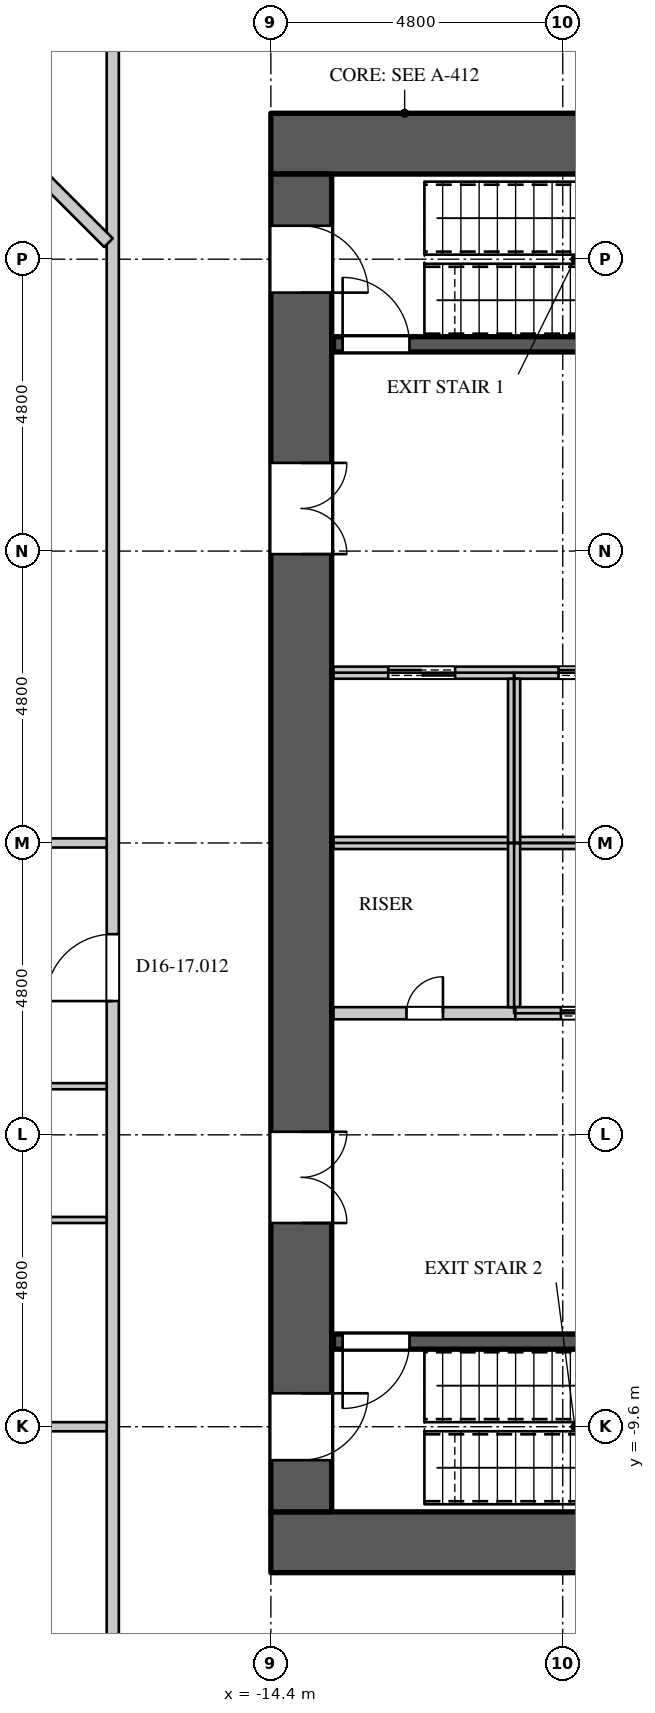
"""IFC4 building model, lengths in metres.
Left out: names, types, materials, properties, quantities, classifications, styles, units other than length and angle.
Written with IfcOpenShell. Run it as: python <this file> out.ifc"""

import sys

from ifc_helpers import new_model, si_unit, direction, frame, frame_2d, origin, place, context, subcontext, project, spatial, rectangle, extrude, element, fill, save


model = new_model("IFC4")
c1 = context("Model", 3, precision=1e-05, world=origin(), true_north=direction((0.0, 1.0)))
c2 = subcontext(c1, "Body", "Model", "MODEL_VIEW")
j1 = project(units=[si_unit("LENGTHUNIT", "METRE"), si_unit("PLANEANGLEUNIT", "RADIAN")], contexts=[c1])
p1 = place(None, origin())
s1 = spatial("IfcSite", under=j1, at=p1, CompositionType="ELEMENT")
p2 = place(p1, origin())
s2 = spatial("IfcBuilding", under=s1, at=p2, CompositionType="ELEMENT")
p3 = place(p2, frame((0.0, 0.0, 71.7)))
s3 = spatial("IfcBuildingStorey", under=s2, at=p3, CompositionType="ELEMENT", Elevation=71.7)
for number, where, z_axis, x_axis in (
    (1, (-14.4, 11.5, 0.0), (0.0, 0.0, 1.0), (1.0, 0.0, 0.0)),
    (2, (-14.4, -11.5, 0.0), (0.0, 0.0, 1.0), (1.0, 0.0, 0.0)),
):
    element("IfcWall", number, at=place(p3, frame(where, z_axis=z_axis, x_axis=x_axis)), inside=s3, PredefinedType="SHEAR", context=c2, shape_type="SweptSolid", body=[
        extrude(rectangle(XDim=28.8, YDim=1.0, at=frame_2d((14.4, 0.0))), origin(), (0.0, 0.0, 1.0), 4.2),
    ])
p4 = place(p3, frame((-13.9, -11.0, 0.0), z_axis=(0.0, 0.0, 1.0), x_axis=(0.0, 1.0, 0.0)))
e3 = element("IfcWall", 3, at=p4, inside=s3, PredefinedType="SHEAR", context=c2, shape_type="SweptSolid", body=[
    extrude(rectangle(XDim=22.0, YDim=1.0, at=frame_2d((11.0, 0.0))), origin(), (0.0, 0.0, 1.0), 4.2),
])
p5 = place(p4, frame((20.05, 0.0, 0.0)))
e4 = element("IfcOpeningElement", 4, at=p5, cuts=e3, PredefinedType="OPENING", context=c2, shape_type="SweptSolid", body=[
    extrude(rectangle(XDim=1.1, YDim=2.2, at=frame_2d((0.55, 1.1))), frame((0.0, 0.51, 0.0), z_axis=(0.0, -1.0, 0.0), x_axis=(1.0, 0.0, 0.0)), (0.0, 0.0, 1.0), 1.02),
])
p6 = place(p4, frame((0.85, 0.0, 0.0)))
e5 = element("IfcOpeningElement", 5, at=p6, cuts=e3, PredefinedType="OPENING", context=c2, shape_type="SweptSolid", body=[
    extrude(rectangle(XDim=1.1, YDim=2.2, at=frame_2d((0.55, 1.1))), frame((0.0, 0.51, 0.0), z_axis=(0.0, -1.0, 0.0), x_axis=(1.0, 0.0, 0.0)), (0.0, 0.0, 1.0), 1.02),
])
p7 = place(p4, frame((15.75, 0.0, 0.0)))
e6 = element("IfcOpeningElement", 6, at=p7, cuts=e3, PredefinedType="OPENING", context=c2, shape_type="SweptSolid", body=[
    extrude(rectangle(XDim=1.5, YDim=2.4, at=frame_2d((0.75, 1.2))), frame((0.0, 0.51, 0.0), z_axis=(0.0, -1.0, 0.0), x_axis=(1.0, 0.0, 0.0)), (0.0, 0.0, 1.0), 1.02),
])
p8 = place(p4, frame((4.75, 0.0, 0.0)))
e7 = element("IfcOpeningElement", 7, at=p8, cuts=e3, PredefinedType="OPENING", context=c2, shape_type="SweptSolid", body=[
    extrude(rectangle(XDim=1.5, YDim=2.4, at=frame_2d((0.75, 1.2))), frame((0.0, 0.51, 0.0), z_axis=(0.0, -1.0, 0.0), x_axis=(1.0, 0.0, 0.0)), (0.0, 0.0, 1.0), 1.02),
])
p9 = place(p3, frame((-17.0, -14.5, 0.0), z_axis=(0.0, 0.0, 1.0), x_axis=(0.0, 1.0, 0.0)))
e8 = element("IfcWall", 8, at=p9, inside=s3, PredefinedType="PARTITIONING", context=c2, shape_type="SweptSolid", body=[
    extrude(rectangle(XDim=29.0, YDim=0.2, at=frame_2d((14.5, 0.0))), origin(), (0.0, 0.0, 1.0), 3.95),
])
p10 = place(p9, frame((11.9, 0.0, 0.0)))
e9 = element("IfcOpeningElement", 9, at=p10, cuts=e8, PredefinedType="OPENING", context=c2, shape_type="SweptSolid", body=[
    extrude(rectangle(XDim=1.1, YDim=2.4, at=frame_2d((0.55, 1.2))), frame((0.0, 0.11, 0.0), z_axis=(0.0, -1.0, 0.0), x_axis=(1.0, 0.0, 0.0)), (0.0, 0.0, 1.0), 0.22),
])
p11 = place(p3, frame((-28.855, -9.6, 0.0), z_axis=(0.0, 0.0, 1.0), x_axis=(1.0, 0.0, 0.0)))
e10 = element("IfcWall", 10, at=p11, inside=s3, PredefinedType="PARTITIONING", context=c2, shape_type="SweptSolid", body=[
    extrude(rectangle(XDim=11.755, YDim=0.15, at=frame_2d((5.877, 0.0))), origin(), (0.0, 0.0, 1.0), 3.95),
])
p12 = place(p11, frame((2.3, 0.0, 0.0)))
e11 = element("IfcOpeningElement", 11, at=p12, cuts=e10, PredefinedType="OPENING", context=c2, shape_type="SweptSolid", body=[
    extrude(rectangle(XDim=1.5, YDim=2.2, at=frame_2d((0.75, 1.1))), frame((0.0, 0.085, 0.0), z_axis=(0.0, -1.0, 0.0), x_axis=(1.0, 0.0, 0.0)), (0.0, 0.0, 1.0), 0.17),
])
p13 = place(p11, frame((9.0, 0.0, 0.0)))
e12 = element("IfcOpeningElement", 12, at=p13, cuts=e10, PredefinedType="OPENING", context=c2, shape_type="SweptSolid", body=[
    extrude(rectangle(XDim=0.95, YDim=2.2, at=frame_2d((0.475, 1.1))), frame((0.0, 0.085, 0.0), z_axis=(0.0, -1.0, 0.0), x_axis=(1.0, 0.0, 0.0)), (0.0, 0.0, 1.0), 0.17),
])
p14 = place(p3, frame((-28.855, 0.0, 0.0), z_axis=(0.0, 0.0, 1.0), x_axis=(1.0, 0.0, 0.0)))
e13 = element("IfcWall", 13, at=p14, inside=s3, PredefinedType="PARTITIONING", context=c2, shape_type="SweptSolid", body=[
    extrude(rectangle(XDim=11.755, YDim=0.15, at=frame_2d((5.877, 0.0))), origin(), (0.0, 0.0, 1.0), 3.95),
])
p15 = place(p14, frame((9.0, 0.0, 0.0)))
e14 = element("IfcOpeningElement", 14, at=p15, cuts=e13, PredefinedType="OPENING", context=c2, shape_type="SweptSolid", body=[
    extrude(rectangle(XDim=0.95, YDim=2.2, at=frame_2d((0.475, 1.1))), frame((0.0, 0.085, 0.0), z_axis=(0.0, -1.0, 0.0), x_axis=(1.0, 0.0, 0.0)), (0.0, 0.0, 1.0), 0.17),
])
p16 = place(p3, frame((-22.747, -11.968, 0.0), z_axis=(0.0, 0.0, 1.0), x_axis=(0.707106781187, -0.707106781187, 0.0)))
e15 = element("IfcWall", 15, at=p16, inside=s3, PredefinedType="PARTITIONING", context=c2, shape_type="SweptSolid", body=[
    extrude(rectangle(XDim=12.613, YDim=0.15, at=frame_2d((6.307, 0.0))), origin(), (0.0, 0.0, 1.0), 3.95),
])
p17 = place(p16, frame((4.45, 0.0, 0.0)))
e16 = element("IfcOpeningElement", 16, at=p17, cuts=e15, PredefinedType="OPENING", context=c2, shape_type="SweptSolid", body=[
    extrude(rectangle(XDim=0.95, YDim=2.2, at=frame_2d((0.475, 1.1))), frame((0.0, 0.085, 0.0), z_axis=(0.0, -1.0, 0.0), x_axis=(1.0, 0.0, 0.0)), (0.0, 0.0, 1.0), 0.17),
])
p18 = place(p16, frame((9.65, 0.0, 0.0)))
e17 = element("IfcOpeningElement", 17, at=p18, cuts=e15, PredefinedType="OPENING", context=c2, shape_type="SweptSolid", body=[
    extrude(rectangle(XDim=0.95, YDim=2.2, at=frame_2d((0.475, 1.1))), frame((0.0, 0.085, 0.0), z_axis=(0.0, -1.0, 0.0), x_axis=(1.0, 0.0, 0.0)), (0.0, 0.0, 1.0), 0.17),
])
p19 = place(p3, frame((-25.239, 18.039, 0.0), z_axis=(0.0, 0.0, 1.0), x_axis=(0.707096213553, -0.707117348662, 0.0)))
e18 = element("IfcWall", 18, at=p19, inside=s3, PredefinedType="PARTITIONING", context=c2, shape_type="SweptSolid", body=[
    extrude(rectangle(XDim=11.552, YDim=0.2, at=frame_2d((5.776, 0.0))), origin(), (0.0, 0.0, 1.0), 3.95),
])
p20 = place(p3, frame((-13.37, -2.8, 0.0), z_axis=(0.0, 0.0, 1.0), x_axis=(1.0, 0.0, 0.0)))
e19 = element("IfcWall", 19, at=p20, inside=s3, PredefinedType="PARTITIONING", context=c2, shape_type="SweptSolid", body=[
    extrude(rectangle(XDim=2.99, YDim=0.2, at=frame_2d((1.495, 0.0))), origin(), (0.0, 0.0, 1.0), 3.95),
])
p21 = place(p20, frame((1.2, 0.0, 0.0)))
e20 = element("IfcOpeningElement", 20, at=p21, cuts=e19, PredefinedType="OPENING", context=c2, shape_type="SweptSolid", body=[
    extrude(rectangle(XDim=0.6, YDim=2.0, at=frame_2d((0.3, 1.0))), frame((0.0, 0.11, 0.0), z_axis=(0.0, -1.0, 0.0), x_axis=(1.0, 0.0, 0.0)), (0.0, 0.0, 1.0), 0.22),
])
p22 = place(p3, frame((-13.37, 0.0, 0.0), z_axis=(0.0, 0.0, 1.0), x_axis=(1.0, 0.0, 0.0)))
e21 = element("IfcWall", 21, at=p22, inside=s3, PredefinedType="PARTITIONING", context=c2, shape_type="SweptSolid", body=[
    extrude(rectangle(XDim=23.77, YDim=0.2, at=frame_2d((11.885, 0.0))), origin(), (0.0, 0.0, 1.0), 3.95),
])
p23 = place(p3, frame((-13.37, 2.8, 0.0), z_axis=(0.0, 0.0, 1.0), x_axis=(1.0, 0.0, 0.0)))
e22 = element("IfcWall", 22, at=p23, inside=s3, PredefinedType="PARTITIONING", context=c2, shape_type="SweptSolid", body=[
    extrude(rectangle(XDim=23.77, YDim=0.2, at=frame_2d((11.885, 0.0))), origin(), (0.0, 0.0, 1.0), 3.95),
])
p24 = place(p23, frame((0.9, 0.0, 0.0)))
e23 = element("IfcOpeningElement", 23, at=p24, cuts=e22, PredefinedType="OPENING", context=c2, shape_type="SweptSolid", body=[
    extrude(rectangle(XDim=1.1, YDim=2.2, at=frame_2d((0.55, 1.1))), frame((0.0, 0.11, 0.0), z_axis=(0.0, -1.0, 0.0), x_axis=(1.0, 0.0, 0.0)), (0.0, 0.0, 1.0), 0.22),
])
p25 = place(p23, frame((3.7, 0.0, 0.0)))
e24 = element("IfcOpeningElement", 24, at=p25, cuts=e22, PredefinedType="OPENING", context=c2, shape_type="SweptSolid", body=[
    extrude(rectangle(XDim=1.1, YDim=2.2, at=frame_2d((0.55, 1.1))), frame((0.0, 0.11, 0.0), z_axis=(0.0, -1.0, 0.0), x_axis=(1.0, 0.0, 0.0)), (0.0, 0.0, 1.0), 0.22),
])
p26 = place(p23, frame((6.3, 0.0, 0.0)))
e25 = element("IfcOpeningElement", 25, at=p26, cuts=e22, PredefinedType="OPENING", context=c2, shape_type="SweptSolid", body=[
    extrude(rectangle(XDim=1.1, YDim=2.2, at=frame_2d((0.55, 1.1))), frame((0.0, 0.11, 0.0), z_axis=(0.0, -1.0, 0.0), x_axis=(1.0, 0.0, 0.0)), (0.0, 0.0, 1.0), 0.22),
])
p27 = place(p23, frame((8.9, 0.0, 0.0)))
e26 = element("IfcOpeningElement", 26, at=p27, cuts=e22, PredefinedType="OPENING", context=c2, shape_type="SweptSolid", body=[
    extrude(rectangle(XDim=1.1, YDim=2.2, at=frame_2d((0.55, 1.1))), frame((0.0, 0.11, 0.0), z_axis=(0.0, -1.0, 0.0), x_axis=(1.0, 0.0, 0.0)), (0.0, 0.0, 1.0), 0.22),
])
p28 = place(p23, frame((11.5, 0.0, 0.0)))
e27 = element("IfcOpeningElement", 27, at=p28, cuts=e22, PredefinedType="OPENING", context=c2, shape_type="SweptSolid", body=[
    extrude(rectangle(XDim=1.1, YDim=2.2, at=frame_2d((0.55, 1.1))), frame((0.0, 0.11, 0.0), z_axis=(0.0, -1.0, 0.0), x_axis=(1.0, 0.0, 0.0)), (0.0, 0.0, 1.0), 0.22),
])
p29 = place(p23, frame((14.1, 0.0, 0.0)))
e28 = element("IfcOpeningElement", 28, at=p29, cuts=e22, PredefinedType="OPENING", context=c2, shape_type="SweptSolid", body=[
    extrude(rectangle(XDim=1.1, YDim=2.2, at=frame_2d((0.55, 1.1))), frame((0.0, 0.11, 0.0), z_axis=(0.0, -1.0, 0.0), x_axis=(1.0, 0.0, 0.0)), (0.0, 0.0, 1.0), 0.22),
])
p30 = place(p23, frame((16.7, 0.0, 0.0)))
e29 = element("IfcOpeningElement", 29, at=p30, cuts=e22, PredefinedType="OPENING", context=c2, shape_type="SweptSolid", body=[
    extrude(rectangle(XDim=1.1, YDim=2.2, at=frame_2d((0.55, 1.1))), frame((0.0, 0.11, 0.0), z_axis=(0.0, -1.0, 0.0), x_axis=(1.0, 0.0, 0.0)), (0.0, 0.0, 1.0), 0.22),
])
p31 = place(p23, frame((19.3, 0.0, 0.0)))
e30 = element("IfcOpeningElement", 30, at=p31, cuts=e22, PredefinedType="OPENING", context=c2, shape_type="SweptSolid", body=[
    extrude(rectangle(XDim=1.1, YDim=2.2, at=frame_2d((0.55, 1.1))), frame((0.0, 0.11, 0.0), z_axis=(0.0, -1.0, 0.0), x_axis=(1.0, 0.0, 0.0)), (0.0, 0.0, 1.0), 0.22),
])
p32 = place(p3, frame((-10.4, -2.7, 0.0), z_axis=(0.0, 0.0, 1.0), x_axis=(0.0, 1.0, 0.0)))
e31 = element("IfcWall", 31, at=p32, inside=s3, PredefinedType="PARTITIONING", context=c2, shape_type="SweptSolid", body=[
    extrude(rectangle(XDim=2.7, YDim=0.2, at=frame_2d((1.35, 0.0))), origin(), (0.0, 0.0, 1.0), 3.95),
])
p33 = place(p3, frame((-10.38, -2.8, 0.0), z_axis=(0.0, 0.0, 1.0), x_axis=(1.0, 0.0, 0.0)))
e32 = element("IfcWall", 32, at=p33, inside=s3, PredefinedType="PARTITIONING", context=c2, shape_type="SweptSolid", body=[
    extrude(rectangle(XDim=2.58, YDim=0.2, at=frame_2d((1.29, 0.0))), origin(), (0.0, 0.0, 1.0), 3.95),
])
p34 = place(p33, frame((0.75, 0.0, 0.0)))
e33 = element("IfcOpeningElement", 33, at=p34, cuts=e32, PredefinedType="OPENING", context=c2, shape_type="SweptSolid", body=[
    extrude(rectangle(XDim=1.1, YDim=2.2, at=frame_2d((0.55, 1.1))), frame((0.0, 0.11, 0.0), z_axis=(0.0, -1.0, 0.0), x_axis=(1.0, 0.0, 0.0)), (0.0, 0.0, 1.0), 0.22),
])
p35 = place(p3, frame((-10.4, 0.0, 0.0), z_axis=(0.0, 0.0, 1.0), x_axis=(0.0, 1.0, 0.0)))
e34 = element("IfcWall", 34, at=p35, inside=s3, PredefinedType="PARTITIONING", context=c2, shape_type="SweptSolid", body=[
    extrude(rectangle(XDim=2.7, YDim=0.2, at=frame_2d((1.35, 0.0))), origin(), (0.0, 0.0, 1.0), 3.95),
])
p36 = place(p3, frame((-13.37, -8.2, 0.0), z_axis=(0.0, 0.0, 1.0), x_axis=(1.0, 0.0, 0.0)))
e35 = element("IfcWall", 35, at=p36, inside=s3, PredefinedType="SHEAR", context=c2, shape_type="SweptSolid", body=[
    extrude(rectangle(XDim=8.095, YDim=0.25, at=frame_2d((4.048, 0.0))), origin(), (0.0, 0.0, 1.0), 3.95),
])
p37 = place(p36, frame((0.15, 0.0, 0.0)))
e36 = element("IfcOpeningElement", 36, at=p37, cuts=e35, PredefinedType="OPENING", context=c2, shape_type="SweptSolid", body=[
    extrude(rectangle(XDim=1.1, YDim=2.2, at=frame_2d((0.55, 1.1))), frame((0.0, 0.135, 0.0), z_axis=(0.0, -1.0, 0.0), x_axis=(1.0, 0.0, 0.0)), (0.0, 0.0, 1.0), 0.27),
])
p38 = place(p3, frame((-13.37, 8.2, 0.0), z_axis=(0.0, 0.0, 1.0), x_axis=(1.0, 0.0, 0.0)))
e37 = element("IfcWall", 37, at=p38, inside=s3, PredefinedType="SHEAR", context=c2, shape_type="SweptSolid", body=[
    extrude(rectangle(XDim=8.095, YDim=0.25, at=frame_2d((4.048, 0.0))), origin(), (0.0, 0.0, 1.0), 3.95),
])
p39 = place(p38, frame((0.15, 0.0, 0.0)))
e38 = element("IfcOpeningElement", 38, at=p39, cuts=e37, PredefinedType="OPENING", context=c2, shape_type="SweptSolid", body=[
    extrude(rectangle(XDim=1.1, YDim=2.2, at=frame_2d((0.55, 1.1))), frame((0.0, 0.135, 0.0), z_axis=(0.0, -1.0, 0.0), x_axis=(1.0, 0.0, 0.0)), (0.0, 0.0, 1.0), 0.27),
])
p40 = place(p3, frame((-21.725, -6.2, 0.0), z_axis=(0.0, 0.0, 1.0), x_axis=(1.0, 0.0, 0.0)))
e39 = element("IfcWall", 39, at=p40, inside=s3, PredefinedType="PARTITIONING", context=c2, shape_type="SweptSolid", body=[
    extrude(rectangle(XDim=4.625, YDim=0.1, at=frame_2d((2.312, 0.0))), origin(), (0.0, 0.0, 1.0), 3.95),
])
p41 = place(p3, frame((-21.75, -4.0, 0.0), z_axis=(0.0, 0.0, 1.0), x_axis=(1.0, 0.0, 0.0)))
e40 = element("IfcWall", 40, at=p41, inside=s3, PredefinedType="PARTITIONING", context=c2, shape_type="SweptSolid", body=[
    extrude(rectangle(XDim=4.65, YDim=0.1, at=frame_2d((2.325, 0.0))), origin(), (0.0, 0.0, 1.0), 3.95),
])
p42 = place(p41, frame((1.9, 0.0, 0.0)))
e41 = element("IfcOpeningElement", 41, at=p42, cuts=e40, PredefinedType="OPENING", context=c2, shape_type="SweptSolid", body=[
    extrude(rectangle(XDim=0.9, YDim=2.2, at=frame_2d((0.45, 1.1))), frame((0.0, 0.06, 0.0), z_axis=(0.0, -1.0, 0.0), x_axis=(1.0, 0.0, 0.0)), (0.0, 0.0, 1.0), 0.12),
])
p43 = place(p21, origin())
e42 = element("IfcDoor", 42, at=p43, inside=s3, OperationType="SINGLE_SWING_RIGHT", PredefinedType="DOOR", context=c2, shape_type="SweptSolid", body=[
    extrude(rectangle(XDim=0.6, YDim=2.0, at=frame_2d((0.3, 1.0))), frame((0.0, 0.025, 0.0), z_axis=(0.0, -1.0, 0.0), x_axis=(1.0, 0.0, 0.0)), (0.0, 0.0, 1.0), 0.05),
])
fill(e20, e42)
p44 = place(p24, origin())
e43 = element("IfcDoor", 43, at=p44, inside=s3, OperationType="DOUBLE_DOOR_SLIDING", PredefinedType="DOOR", context=c2, shape_type="SweptSolid", body=[
    extrude(rectangle(XDim=1.1, YDim=2.2, at=frame_2d((0.55, 1.1))), frame((0.0, 0.025, 0.0), z_axis=(0.0, -1.0, 0.0), x_axis=(1.0, 0.0, 0.0)), (0.0, 0.0, 1.0), 0.05),
])
fill(e23, e43)
p45 = place(p25, origin())
e44 = element("IfcDoor", 44, at=p45, inside=s3, OperationType="DOUBLE_DOOR_SLIDING", PredefinedType="DOOR", context=c2, shape_type="SweptSolid", body=[
    extrude(rectangle(XDim=1.1, YDim=2.2, at=frame_2d((0.55, 1.1))), frame((0.0, 0.025, 0.0), z_axis=(0.0, -1.0, 0.0), x_axis=(1.0, 0.0, 0.0)), (0.0, 0.0, 1.0), 0.05),
])
fill(e24, e44)
p46 = place(p34, origin())
e45 = element("IfcDoor", 45, at=p46, inside=s3, OperationType="DOUBLE_DOOR_SLIDING", PredefinedType="DOOR", context=c2, shape_type="SweptSolid", body=[
    extrude(rectangle(XDim=1.1, YDim=2.2, at=frame_2d((0.55, 1.1))), frame((0.0, 0.025, 0.0), z_axis=(0.0, -1.0, 0.0), x_axis=(1.0, 0.0, 0.0)), (0.0, 0.0, 1.0), 0.05),
])
fill(e33, e45)
p47 = place(p39, origin())
e46 = element("IfcDoor", 46, at=p47, inside=s3, OperationType="SINGLE_SWING_LEFT", PredefinedType="DOOR", context=c2, shape_type="SweptSolid", body=[
    extrude(rectangle(XDim=1.1, YDim=2.2, at=frame_2d((0.55, 1.1))), frame((0.0, 0.025, 0.0), z_axis=(0.0, -1.0, 0.0), x_axis=(1.0, 0.0, 0.0)), (0.0, 0.0, 1.0), 0.05),
])
fill(e38, e46)
p48 = place(p37, origin())
e47 = element("IfcDoor", 47, at=p48, inside=s3, OperationType="SINGLE_SWING_RIGHT", PredefinedType="DOOR", context=c2, shape_type="SweptSolid", body=[
    extrude(rectangle(XDim=1.1, YDim=2.2, at=frame_2d((0.55, 1.1))), frame((0.0, 0.025, 0.0), z_axis=(0.0, -1.0, 0.0), x_axis=(1.0, 0.0, 0.0)), (0.0, 0.0, 1.0), 0.05),
])
fill(e36, e47)
p49 = place(p5, origin())
e48 = element("IfcDoor", 48, at=p49, inside=s3, OperationType="SINGLE_SWING_RIGHT", PredefinedType="DOOR", context=c2, shape_type="SweptSolid", body=[
    extrude(rectangle(XDim=1.1, YDim=2.2, at=frame_2d((0.55, 1.1))), frame((0.0, -0.445, 0.0), z_axis=(0.0, -1.0, 0.0), x_axis=(1.0, 0.0, 0.0)), (0.0, 0.0, 1.0), 0.05),
])
fill(e4, e48)
p50 = place(p6, origin())
e49 = element("IfcDoor", 49, at=p50, inside=s3, OperationType="SINGLE_SWING_LEFT", PredefinedType="DOOR", context=c2, shape_type="SweptSolid", body=[
    extrude(rectangle(XDim=1.1, YDim=2.2, at=frame_2d((0.55, 1.1))), frame((0.0, -0.445, 0.0), z_axis=(0.0, -1.0, 0.0), x_axis=(1.0, 0.0, 0.0)), (0.0, 0.0, 1.0), 0.05),
])
fill(e5, e49)
p51 = place(p7, origin())
e50 = element("IfcDoor", 50, at=p51, inside=s3, OperationType="DOUBLE_DOOR_SINGLE_SWING", PredefinedType="DOOR", context=c2, shape_type="SweptSolid", body=[
    extrude(rectangle(XDim=1.5, YDim=2.4, at=frame_2d((0.75, 1.2))), frame((0.0, -0.445, 0.0), z_axis=(0.0, -1.0, 0.0), x_axis=(1.0, 0.0, 0.0)), (0.0, 0.0, 1.0), 0.05),
])
fill(e6, e50)
p52 = place(p8, origin())
e51 = element("IfcDoor", 51, at=p52, inside=s3, OperationType="DOUBLE_DOOR_SINGLE_SWING", PredefinedType="DOOR", context=c2, shape_type="SweptSolid", body=[
    extrude(rectangle(XDim=1.5, YDim=2.4, at=frame_2d((0.75, 1.2))), frame((0.0, -0.445, 0.0), z_axis=(0.0, -1.0, 0.0), x_axis=(1.0, 0.0, 0.0)), (0.0, 0.0, 1.0), 0.05),
])
fill(e7, e51)
p53 = place(p10, origin())
e52 = element("IfcDoor", 52, at=p53, inside=s3, OperationType="SINGLE_SWING_LEFT", PredefinedType="DOOR", context=c2, shape_type="SweptSolid", body=[
    extrude(rectangle(XDim=1.1, YDim=2.4, at=frame_2d((0.55, 1.2))), frame((0.0, 0.025, 0.0), z_axis=(0.0, -1.0, 0.0), x_axis=(1.0, 0.0, 0.0)), (0.0, 0.0, 1.0), 0.05),
])
fill(e9, e52)
save(model, sys.argv[1])
